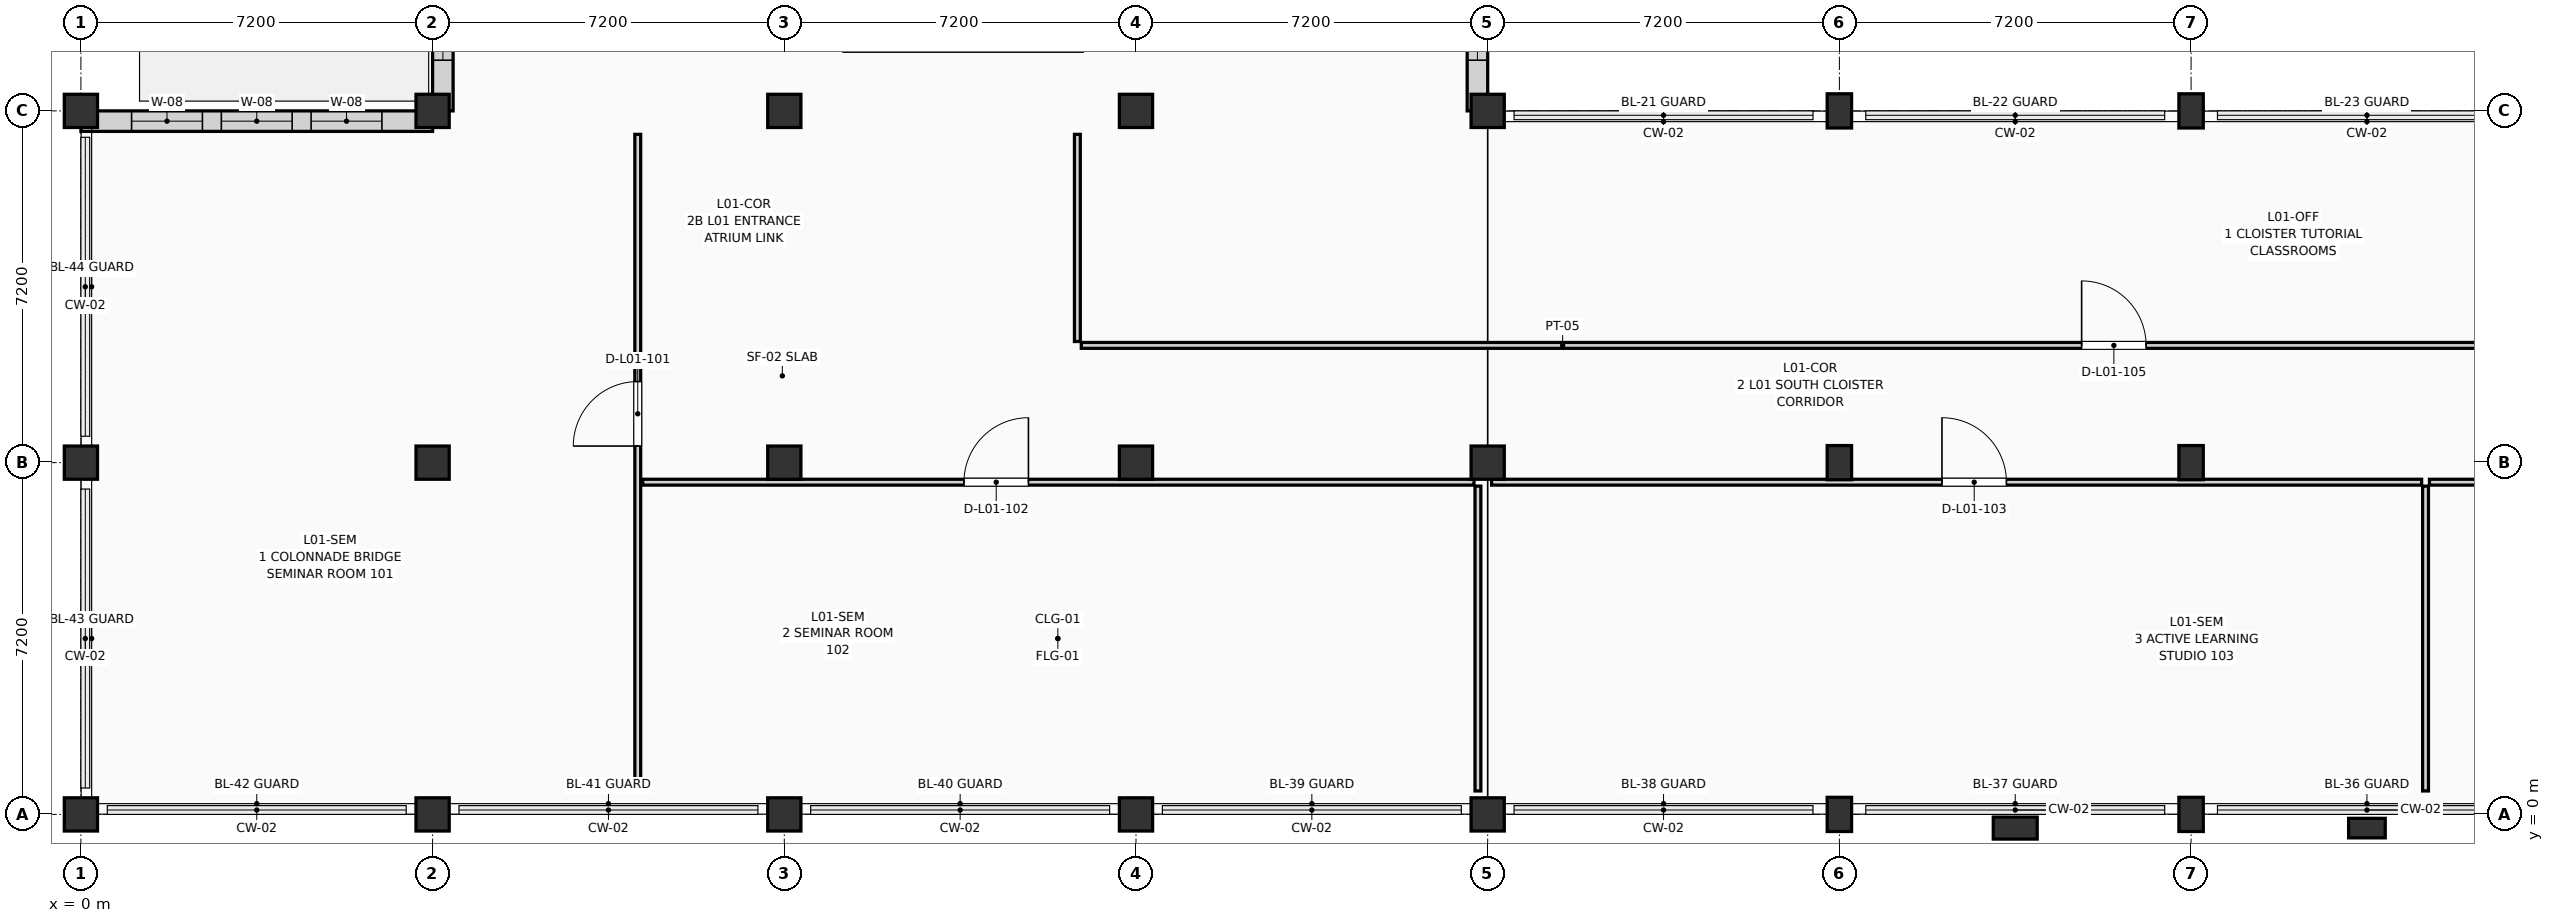
"""IFC4 building model, lengths in metres.
Left out: names, types, materials, properties, quantities, classifications, styles, units other than length and angle.
Written with IfcOpenShell. Run it as: python <this file> out.ifc"""

import sys

from ifc_helpers import new_model, si_unit, direction, frame, frame_2d, origin, origin_2d, place, context, subcontext, project, spatial, rectangle, extrude, element, fill, save


model = new_model("IFC4")
c1 = context("Model", 3, precision=1e-05, world=origin(), true_north=direction((0.0, 1.0)))
c2 = subcontext(c1, "Body", "Model", "MODEL_VIEW")
j1 = project(units=[si_unit("LENGTHUNIT", "METRE"), si_unit("PLANEANGLEUNIT", "RADIAN")], contexts=[c1])
p1 = place(None, origin())
s1 = spatial("IfcSite", under=j1, at=p1, CompositionType="ELEMENT")
p2 = place(p1, origin())
s2 = spatial("IfcBuilding", under=s1, at=p2, CompositionType="ELEMENT")
p3 = place(p2, frame((0.0, 0.0, 4.5)))
s3 = spatial("IfcBuildingStorey", under=s2, at=p3, CompositionType="ELEMENT", Elevation=4.5)
for number, where, z_axis, x_axis in (
    (1, (0.0, 0.0, 0.0), (0.0, 0.0, 1.0), (1.0, 0.0, 0.0)),
    (2, (0.0, 7.2, 0.0), (0.0, 0.0, 1.0), (1.0, 0.0, 0.0)),
    (3, (0.0, 14.4, 0.0), (0.0, 0.0, 1.0), (1.0, 0.0, 0.0)),
    (4, (7.2, 0.0, 0.0), (0.0, 0.0, 1.0), (1.0, 0.0, 0.0)),
    (5, (7.2, 7.2, 0.0), (0.0, 0.0, 1.0), (1.0, 0.0, 0.0)),
    (6, (7.2, 14.4, 0.0), (0.0, 0.0, 1.0), (1.0, 0.0, 0.0)),
    (7, (14.4, 0.0, 0.0), (0.0, 0.0, 1.0), (1.0, 0.0, 0.0)),
    (8, (14.4, 7.2, 0.0), (0.0, 0.0, 1.0), (1.0, 0.0, 0.0)),
    (9, (14.4, 14.4, 0.0), (0.0, 0.0, 1.0), (1.0, 0.0, 0.0)),
    (10, (21.6, 0.0, 0.0), (0.0, 0.0, 1.0), (1.0, 0.0, 0.0)),
    (11, (21.6, 7.2, 0.0), (0.0, 0.0, 1.0), (1.0, 0.0, 0.0)),
    (12, (21.6, 14.4, 0.0), (0.0, 0.0, 1.0), (1.0, 0.0, 0.0)),
    (13, (28.8, 0.0, 0.0), (0.0, 0.0, 1.0), (1.0, 0.0, 0.0)),
    (14, (28.8, 7.2, 0.0), (0.0, 0.0, 1.0), (1.0, 0.0, 0.0)),
    (15, (28.8, 14.4, 0.0), (0.0, 0.0, 1.0), (1.0, 0.0, 0.0)),
):
    element("IfcColumn", number, at=place(p3, frame(where, z_axis=z_axis, x_axis=x_axis)), inside=s3, PredefinedType="COLUMN", context=c2, shape_type="SweptSolid", body=[
        extrude(rectangle(XDim=0.68, YDim=0.68, at=origin_2d()), origin(), (0.0, 0.0, 1.0), 4.05),
    ])
for number, where, z_axis, x_axis in (
    (16, (36.0, 0.0, 0.0), (0.0, 0.0, 1.0), (1.0, 0.0, 0.0)),
    (17, (36.0, 7.2, 0.0), (0.0, 0.0, 1.0), (1.0, 0.0, 0.0)),
    (18, (36.0, 14.4, 0.0), (0.0, 0.0, 1.0), (1.0, 0.0, 0.0)),
    (19, (43.2, 0.0, 0.0), (0.0, 0.0, 1.0), (1.0, 0.0, 0.0)),
    (20, (43.2, 7.2, 0.0), (0.0, 0.0, 1.0), (1.0, 0.0, 0.0)),
    (21, (43.2, 14.4, 0.0), (0.0, 0.0, 1.0), (1.0, 0.0, 0.0)),
):
    element("IfcColumn", number, at=place(p3, frame(where, z_axis=z_axis, x_axis=x_axis)), inside=s3, PredefinedType="COLUMN", context=c2, shape_type="SweptSolid", body=[
        extrude(rectangle(XDim=0.5, YDim=0.7, at=origin_2d()), origin(), (0.0, 0.0, 1.0), 4.05),
    ])
p4 = place(p3, frame((39.6, -0.28, 0.0), z_axis=(0.0, 0.0, 1.0), x_axis=(0.0, 1.0, 0.0)))
e22 = element("IfcColumn", 22, at=p4, inside=s3, PredefinedType="PILASTER", context=c2, shape_type="SweptSolid", body=[
    extrude(rectangle(XDim=0.45, YDim=0.9, at=origin_2d()), origin(), (0.0, 0.0, 1.0), 4.05),
])
p5 = place(p3, frame((46.8, -0.28, 0.0), z_axis=(0.0, 0.0, 1.0), x_axis=(0.0, 1.0, 0.0)))
e23 = element("IfcColumn", 23, at=p5, inside=s3, PredefinedType="PILASTER", context=c2, shape_type="SweptSolid", body=[
    extrude(rectangle(XDim=0.4, YDim=0.75, at=origin_2d()), origin(), (0.0, 0.0, 1.0), 4.05),
])
p6 = place(p3, frame((7.41, 14.4, 0.0), z_axis=(0.0, 0.0, 1.0), x_axis=(0.0, 1.0, 0.0)))
e24 = element("IfcWall", 24, at=p6, inside=s3, PredefinedType="SOLIDWALL", context=c2, shape_type="SweptSolid", body=[
    extrude(rectangle(XDim=7.2, YDim=0.42, at=frame_2d((3.6, 0.0))), origin(), (0.0, 0.0, 1.0), 3.16),
])
p7 = place(p6, frame((1.038, 0.0, 0.18)))
e25 = element("IfcOpeningElement", 25, at=p7, cuts=e24, PredefinedType="OPENING", context=c2, shape_type="SweptSolid", body=[
    extrude(rectangle(XDim=1.45, YDim=2.8, at=frame_2d((0.725, 1.4))), frame((0.0, 0.222, 0.0), z_axis=(0.0, -1.0, 0.0), x_axis=(1.0, 0.0, 0.0)), (0.0, 0.0, 1.0), 0.444),
])
p8 = place(p6, frame((2.875, 0.0, 0.18)))
e26 = element("IfcOpeningElement", 26, at=p8, cuts=e24, PredefinedType="OPENING", context=c2, shape_type="SweptSolid", body=[
    extrude(rectangle(XDim=1.45, YDim=2.8, at=frame_2d((0.725, 1.4))), frame((0.0, 0.222, 0.0), z_axis=(0.0, -1.0, 0.0), x_axis=(1.0, 0.0, 0.0)), (0.0, 0.0, 1.0), 0.444),
])
p9 = place(p6, frame((4.712, 0.0, 0.18)))
e27 = element("IfcOpeningElement", 27, at=p9, cuts=e24, PredefinedType="OPENING", context=c2, shape_type="SweptSolid", body=[
    extrude(rectangle(XDim=1.45, YDim=2.8, at=frame_2d((0.725, 1.4))), frame((0.0, 0.222, 0.0), z_axis=(0.0, -1.0, 0.0), x_axis=(1.0, 0.0, 0.0)), (0.0, 0.0, 1.0), 0.444),
])
p10 = place(p3, frame((28.59, 14.4, 0.0), z_axis=(0.0, 0.0, 1.0), x_axis=(0.0, 1.0, 0.0)))
e28 = element("IfcWall", 28, at=p10, inside=s3, PredefinedType="SOLIDWALL", context=c2, shape_type="SweptSolid", body=[
    extrude(rectangle(XDim=7.2, YDim=0.42, at=frame_2d((3.6, 0.0))), origin(), (0.0, 0.0, 1.0), 3.16),
])
p11 = place(p10, frame((1.038, 0.0, 0.18)))
e29 = element("IfcOpeningElement", 29, at=p11, cuts=e28, PredefinedType="OPENING", context=c2, shape_type="SweptSolid", body=[
    extrude(rectangle(XDim=1.45, YDim=2.8, at=frame_2d((0.725, 1.4))), frame((0.0, 0.222, 0.0), z_axis=(0.0, -1.0, 0.0), x_axis=(1.0, 0.0, 0.0)), (0.0, 0.0, 1.0), 0.444),
])
p12 = place(p10, frame((2.875, 0.0, 0.18)))
e30 = element("IfcOpeningElement", 30, at=p12, cuts=e28, PredefinedType="OPENING", context=c2, shape_type="SweptSolid", body=[
    extrude(rectangle(XDim=1.45, YDim=2.8, at=frame_2d((0.725, 1.4))), frame((0.0, 0.222, 0.0), z_axis=(0.0, -1.0, 0.0), x_axis=(1.0, 0.0, 0.0)), (0.0, 0.0, 1.0), 0.444),
])
p13 = place(p10, frame((4.712, 0.0, 0.18)))
e31 = element("IfcOpeningElement", 31, at=p13, cuts=e28, PredefinedType="OPENING", context=c2, shape_type="SweptSolid", body=[
    extrude(rectangle(XDim=1.45, YDim=2.8, at=frame_2d((0.725, 1.4))), frame((0.0, 0.222, 0.0), z_axis=(0.0, -1.0, 0.0), x_axis=(1.0, 0.0, 0.0)), (0.0, 0.0, 1.0), 0.444),
])
p14 = place(p3, frame((0.0, 14.19, 0.0), z_axis=(0.0, 0.0, 1.0), x_axis=(1.0, 0.0, 0.0)))
e32 = element("IfcWall", 32, at=p14, inside=s3, PredefinedType="SOLIDWALL", context=c2, shape_type="SweptSolid", body=[
    extrude(rectangle(XDim=7.2, YDim=0.42, at=frame_2d((3.6, 0.0))), origin(), (0.0, 0.0, 1.0), 3.16),
])
p15 = place(p14, frame((1.038, 0.0, 0.18)))
e33 = element("IfcOpeningElement", 33, at=p15, cuts=e32, PredefinedType="OPENING", context=c2, shape_type="SweptSolid", body=[
    extrude(rectangle(XDim=1.45, YDim=2.8, at=frame_2d((0.725, 1.4))), frame((0.0, 0.222, 0.0), z_axis=(0.0, -1.0, 0.0), x_axis=(1.0, 0.0, 0.0)), (0.0, 0.0, 1.0), 0.444),
])
p16 = place(p14, frame((2.875, 0.0, 0.18)))
e34 = element("IfcOpeningElement", 34, at=p16, cuts=e32, PredefinedType="OPENING", context=c2, shape_type="SweptSolid", body=[
    extrude(rectangle(XDim=1.45, YDim=2.8, at=frame_2d((0.725, 1.4))), frame((0.0, 0.222, 0.0), z_axis=(0.0, -1.0, 0.0), x_axis=(1.0, 0.0, 0.0)), (0.0, 0.0, 1.0), 0.444),
])
p17 = place(p14, frame((4.712, 0.0, 0.18)))
e35 = element("IfcOpeningElement", 35, at=p17, cuts=e32, PredefinedType="OPENING", context=c2, shape_type="SweptSolid", body=[
    extrude(rectangle(XDim=1.45, YDim=2.8, at=frame_2d((0.725, 1.4))), frame((0.0, 0.222, 0.0), z_axis=(0.0, -1.0, 0.0), x_axis=(1.0, 0.0, 0.0)), (0.0, 0.0, 1.0), 0.444),
])
p18 = place(p3, frame((11.4, 0.48, 0.0), z_axis=(0.0, 0.0, 1.0), x_axis=(0.0, 1.0, 0.0)))
e36 = element("IfcWall", 36, at=p18, inside=s3, PredefinedType="PARTITIONING", context=c2, shape_type="SweptSolid", body=[
    extrude(rectangle(XDim=13.44, YDim=0.12, at=frame_2d((6.72, 0.0))), origin(), (0.0, 0.0, 1.0), 3.775),
])
p19 = place(p18, frame((7.06, 0.0, 0.0)))
e37 = element("IfcOpeningElement", 37, at=p19, cuts=e36, PredefinedType="OPENING", context=c2, shape_type="SweptSolid", body=[
    extrude(rectangle(XDim=1.32, YDim=2.2, at=frame_2d((0.66, 1.1))), frame((0.0, 0.072, 0.0), z_axis=(0.0, -1.0, 0.0), x_axis=(1.0, 0.0, 0.0)), (0.0, 0.0, 1.0), 0.144),
])
p20 = place(p3, frame((28.6, 0.48, 0.0), z_axis=(0.0, 0.0, 1.0), x_axis=(0.0, 1.0, 0.0)))
e38 = element("IfcWall", 38, at=p20, inside=s3, PredefinedType="PARTITIONING", context=c2, shape_type="SweptSolid", body=[
    extrude(rectangle(XDim=6.24, YDim=0.12, at=frame_2d((3.12, 0.0))), origin(), (0.0, 0.0, 1.0), 2.925),
])
p21 = place(p3, frame((11.5, 6.8, 0.0), z_axis=(0.0, 0.0, 1.0), x_axis=(1.0, 0.0, 0.0)))
e39 = element("IfcWall", 39, at=p21, inside=s3, PredefinedType="PARTITIONING", context=c2, shape_type="SweptSolid", body=[
    extrude(rectangle(XDim=17.02, YDim=0.12, at=frame_2d((8.51, 0.0))), origin(), (0.0, 0.0, 1.0), 3.025),
])
p22 = place(p21, frame((6.578, 0.0, 0.0)))
e40 = element("IfcOpeningElement", 40, at=p22, cuts=e39, PredefinedType="OPENING", context=c2, shape_type="SweptSolid", body=[
    extrude(rectangle(XDim=1.32, YDim=2.2, at=frame_2d((0.66, 1.1))), frame((0.0, 0.072, 0.0), z_axis=(0.0, -1.0, 0.0), x_axis=(1.0, 0.0, 0.0)), (0.0, 0.0, 1.0), 0.144),
])
p23 = place(p3, frame((48.0, 0.48, 0.0), z_axis=(0.0, 0.0, 1.0), x_axis=(0.0, 1.0, 0.0)))
e41 = element("IfcWall", 41, at=p23, inside=s3, PredefinedType="PARTITIONING", context=c2, shape_type="SweptSolid", body=[
    extrude(rectangle(XDim=6.24, YDim=0.12, at=frame_2d((3.12, 0.0))), origin(), (0.0, 0.0, 1.0), 3.775),
])
p24 = place(p3, frame((28.88, 6.8, 0.0), z_axis=(0.0, 0.0, 1.0), x_axis=(1.0, 0.0, 0.0)))
e42 = element("IfcWall", 42, at=p24, inside=s3, PredefinedType="PARTITIONING", context=c2, shape_type="SweptSolid", body=[
    extrude(rectangle(XDim=19.04, YDim=0.12, at=frame_2d((9.52, 0.0))), origin(), (0.0, 0.0, 1.0), 3.025),
])
p25 = place(p24, frame((9.22, 0.0, 0.0)))
e43 = element("IfcOpeningElement", 43, at=p25, cuts=e42, PredefinedType="OPENING", context=c2, shape_type="SweptSolid", body=[
    extrude(rectangle(XDim=1.32, YDim=2.2, at=frame_2d((0.66, 1.1))), frame((0.0, 0.072, 0.0), z_axis=(0.0, -1.0, 0.0), x_axis=(1.0, 0.0, 0.0)), (0.0, 0.0, 1.0), 0.144),
])
p26 = place(p3, frame((48.08, 6.8, 0.0), z_axis=(0.0, 0.0, 1.0), x_axis=(1.0, 0.0, 0.0)))
e44 = element("IfcWall", 44, at=p26, inside=s3, PredefinedType="PARTITIONING", context=c2, shape_type="SweptSolid", body=[
    extrude(rectangle(XDim=16.44, YDim=0.12, at=frame_2d((8.22, 0.0))), origin(), (0.0, 0.0, 1.0), 3.025),
])
p27 = place(p26, frame((6.031, 0.0, 0.0)))
e45 = element("IfcOpeningElement", 45, at=p27, cuts=e44, PredefinedType="OPENING", context=c2, shape_type="SweptSolid", body=[
    extrude(rectangle(XDim=1.32, YDim=2.2, at=frame_2d((0.66, 1.1))), frame((0.0, 0.072, 0.0), z_axis=(0.0, -1.0, 0.0), x_axis=(1.0, 0.0, 0.0)), (0.0, 0.0, 1.0), 0.144),
])
p28 = place(p3, frame((20.4, 9.68, 0.0), z_axis=(0.0, 0.0, 1.0), x_axis=(0.0, 1.0, 0.0)))
e46 = element("IfcWall", 46, at=p28, inside=s3, PredefinedType="PARTITIONING", context=c2, shape_type="SweptSolid", body=[
    extrude(rectangle(XDim=4.24, YDim=0.12, at=frame_2d((2.12, 0.0))), origin(), (0.0, 0.0, 1.0), 3.775),
])
p29 = place(p3, frame((20.48, 9.6, 0.0), z_axis=(0.0, 0.0, 1.0), x_axis=(1.0, 0.0, 0.0)))
e47 = element("IfcWall", 47, at=p29, inside=s3, PredefinedType="PARTITIONING", context=c2, shape_type="SweptSolid", body=[
    extrude(rectangle(XDim=44.04, YDim=0.12, at=frame_2d((22.02, 0.0))), origin(), (0.0, 0.0, 1.0), 3.775),
])
p30 = place(p29, frame((20.479, 0.0, 0.0)))
e48 = element("IfcOpeningElement", 48, at=p30, cuts=e47, PredefinedType="OPENING", context=c2, shape_type="SweptSolid", body=[
    extrude(rectangle(XDim=1.32, YDim=2.2, at=frame_2d((0.66, 1.1))), frame((0.0, 0.072, 0.0), z_axis=(0.0, -1.0, 0.0), x_axis=(1.0, 0.0, 0.0)), (0.0, 0.0, 1.0), 0.144),
])
p31 = place(p7, origin())
e49 = element("IfcWindow", 49, at=p31, inside=s3, PartitioningType="SINGLE_PANEL", PredefinedType="WINDOW", context=c2, shape_type="SweptSolid", body=[
    extrude(rectangle(XDim=1.45, YDim=2.8, at=frame_2d((0.725, 1.4))), frame((0.0, 0.03, 0.0), z_axis=(0.0, -1.0, 0.0), x_axis=(1.0, 0.0, 0.0)), (0.0, 0.0, 1.0), 0.06),
])
fill(e25, e49)
p32 = place(p11, origin())
e50 = element("IfcWindow", 50, at=p32, inside=s3, PartitioningType="SINGLE_PANEL", PredefinedType="WINDOW", context=c2, shape_type="SweptSolid", body=[
    extrude(rectangle(XDim=1.45, YDim=2.8, at=frame_2d((0.725, 1.4))), frame((0.0, 0.03, 0.0), z_axis=(0.0, -1.0, 0.0), x_axis=(1.0, 0.0, 0.0)), (0.0, 0.0, 1.0), 0.06),
])
fill(e29, e50)
p33 = place(p15, origin())
e51 = element("IfcWindow", 51, at=p33, inside=s3, PartitioningType="SINGLE_PANEL", PredefinedType="WINDOW", context=c2, shape_type="SweptSolid", body=[
    extrude(rectangle(XDim=1.45, YDim=2.8, at=frame_2d((0.725, 1.4))), frame((0.0, 0.03, 0.0), z_axis=(0.0, -1.0, 0.0), x_axis=(1.0, 0.0, 0.0)), (0.0, 0.0, 1.0), 0.06),
])
fill(e33, e51)
p34 = place(p16, origin())
e52 = element("IfcWindow", 52, at=p34, inside=s3, PartitioningType="SINGLE_PANEL", PredefinedType="WINDOW", context=c2, shape_type="SweptSolid", body=[
    extrude(rectangle(XDim=1.45, YDim=2.8, at=frame_2d((0.725, 1.4))), frame((0.0, 0.03, 0.0), z_axis=(0.0, -1.0, 0.0), x_axis=(1.0, 0.0, 0.0)), (0.0, 0.0, 1.0), 0.06),
])
fill(e34, e52)
p35 = place(p17, origin())
e53 = element("IfcWindow", 53, at=p35, inside=s3, PartitioningType="SINGLE_PANEL", PredefinedType="WINDOW", context=c2, shape_type="SweptSolid", body=[
    extrude(rectangle(XDim=1.45, YDim=2.8, at=frame_2d((0.725, 1.4))), frame((0.0, 0.03, 0.0), z_axis=(0.0, -1.0, 0.0), x_axis=(1.0, 0.0, 0.0)), (0.0, 0.0, 1.0), 0.06),
])
fill(e35, e53)
p36 = place(p19, origin())
e54 = element("IfcDoor", 54, at=p36, inside=s3, OperationType="SINGLE_SWING_LEFT", PredefinedType="DOOR", context=c2, shape_type="SweptSolid", body=[
    extrude(rectangle(XDim=1.32, YDim=2.2, at=frame_2d((0.66, 1.1))), frame((0.0, 0.025, 0.0), z_axis=(0.0, -1.0, 0.0), x_axis=(1.0, 0.0, 0.0)), (0.0, 0.0, 1.0), 0.05),
])
fill(e37, e54)
p37 = place(p22, origin())
e55 = element("IfcDoor", 55, at=p37, inside=s3, OperationType="SINGLE_SWING_RIGHT", PredefinedType="DOOR", context=c2, shape_type="SweptSolid", body=[
    extrude(rectangle(XDim=1.32, YDim=2.2, at=frame_2d((0.66, 1.1))), frame((0.0, 0.025, 0.0), z_axis=(0.0, -1.0, 0.0), x_axis=(1.0, 0.0, 0.0)), (0.0, 0.0, 1.0), 0.05),
])
fill(e40, e55)
p38 = place(p25, origin())
e56 = element("IfcDoor", 56, at=p38, inside=s3, OperationType="SINGLE_SWING_LEFT", PredefinedType="DOOR", context=c2, shape_type="SweptSolid", body=[
    extrude(rectangle(XDim=1.32, YDim=2.2, at=frame_2d((0.66, 1.1))), frame((0.0, 0.025, 0.0), z_axis=(0.0, -1.0, 0.0), x_axis=(1.0, 0.0, 0.0)), (0.0, 0.0, 1.0), 0.05),
])
fill(e43, e56)
p39 = place(p30, origin())
e57 = element("IfcDoor", 57, at=p39, inside=s3, OperationType="SINGLE_SWING_LEFT", PredefinedType="DOOR", context=c2, shape_type="SweptSolid", body=[
    extrude(rectangle(XDim=1.32, YDim=2.2, at=frame_2d((0.66, 1.1))), frame((0.0, 0.025, 0.0), z_axis=(0.0, -1.0, 0.0), x_axis=(1.0, 0.0, 0.0)), (0.0, 0.0, 1.0), 0.05),
])
fill(e48, e57)
save(model, sys.argv[1])
